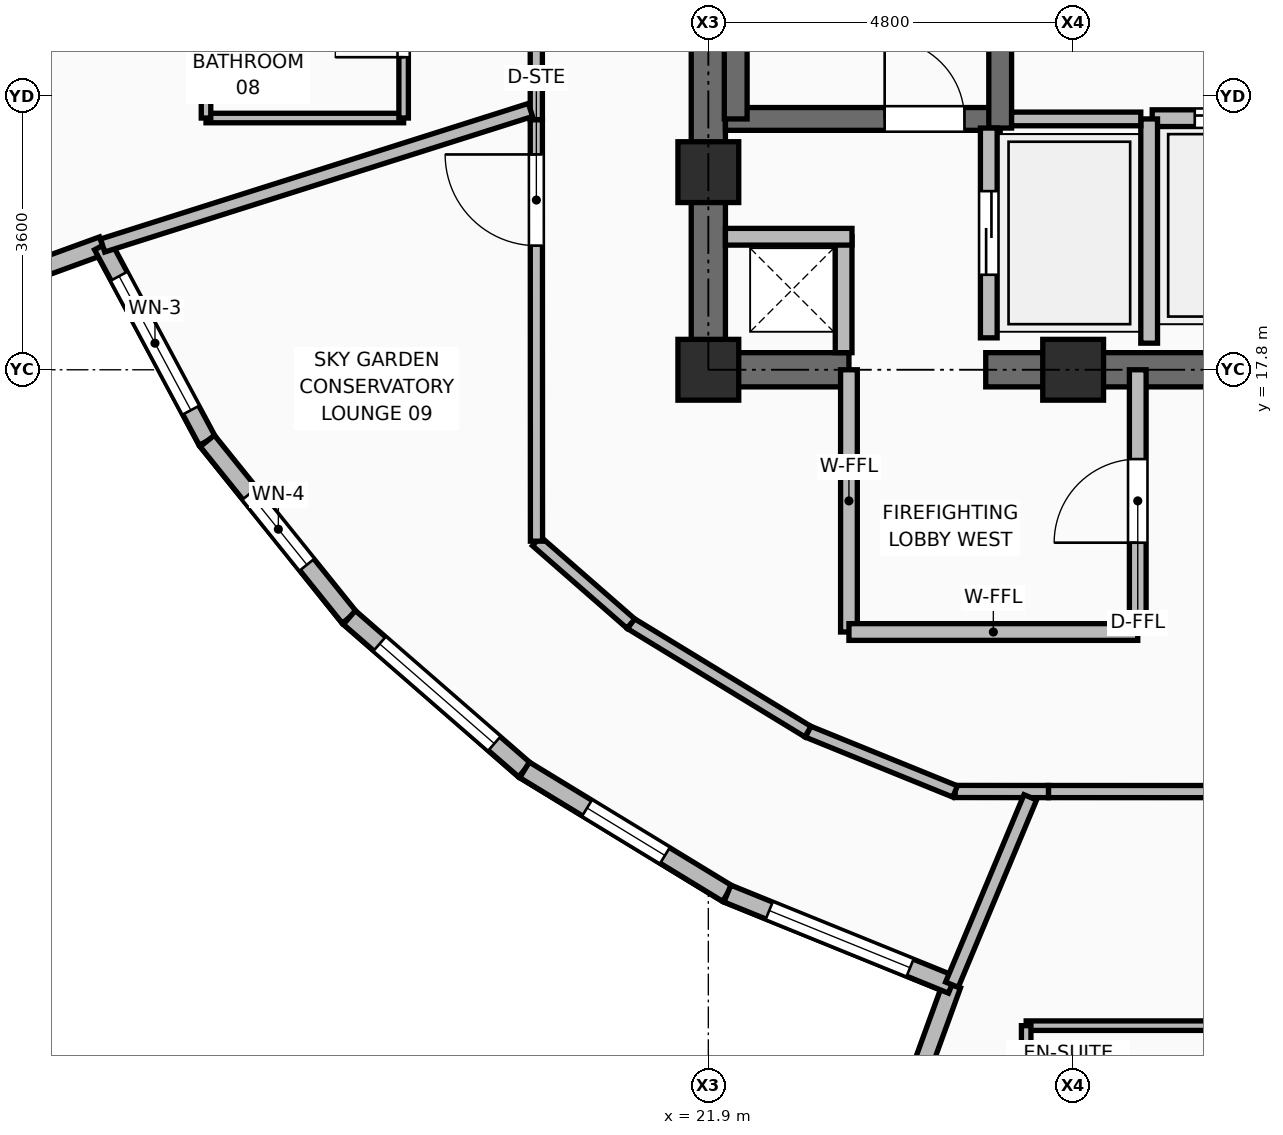
"""IFC4 building model, lengths in metres.
Left out: names, types, materials, properties, quantities, classifications, styles, units other than length and angle.
Written with IfcOpenShell. Run it as: python <this file> out.ifc"""

import sys

from ifc_helpers import new_model, si_unit, direction, frame, frame_2d, origin, origin_2d, place, context, subcontext, project, spatial, rectangle, extrude, element, fill, save


model = new_model("IFC4")
c1 = context("Model", 3, precision=1e-05, world=origin(), true_north=direction((0.0, 1.0)))
c2 = subcontext(c1, "Body", "Model", "MODEL_VIEW")
j1 = project(units=[si_unit("LENGTHUNIT", "METRE"), si_unit("PLANEANGLEUNIT", "RADIAN")], contexts=[c1])
p1 = place(None, origin())
s1 = spatial("IfcSite", under=j1, at=p1, CompositionType="ELEMENT")
p2 = place(p1, origin())
s2 = spatial("IfcBuilding", under=s1, at=p2, CompositionType="ELEMENT")
p3 = place(p2, frame((0.0, 0.0, 216.15)))
s3 = spatial("IfcBuildingStorey", under=s2, at=p3, CompositionType="ELEMENT", Elevation=216.15)
for number, where, z_axis, x_axis in (
    (1, (21.9, 17.8, 0.0), (0.0, 0.0, 1.0), (1.0, 0.0, 0.0)),
    (2, (26.7, 17.8, 0.0), (0.0, 0.0, 1.0), (1.0, 0.0, 0.0)),
    (3, (21.9, 20.4, 0.0), (0.0, 0.0, 1.0), (1.0, 0.0, 0.0)),
):
    element("IfcColumn", number, at=place(p3, frame(where, z_axis=z_axis, x_axis=x_axis)), inside=s3, PredefinedType="COLUMN", context=c2, shape_type="SweptSolid", body=[
        extrude(rectangle(XDim=0.8, YDim=0.8, at=origin_2d()), origin(), (0.0, 0.0, 1.0), 3.75),
    ])
for number, where, z_axis, x_axis in (
    (4, (10.36, 18.135, 0.0), (0.0, 0.0, 1.0), (0.94, 0.342, 0.0)),
    (5, (25.105, 9.71, 0.0), (0.0, 0.0, 1.0), (-0.342, -0.94, 0.0)),
):
    element("IfcWall", number, at=place(p3, frame(where, z_axis=z_axis, x_axis=x_axis)), inside=s3, PredefinedType="SOLIDWALL", context=c2, shape_type="SweptSolid", body=[
        extrude(rectangle(XDim=3.8, YDim=0.24, at=frame_2d((1.9, 0.0))), origin(), (0.0, 0.0, 1.0), 3.57),
    ])
p4 = place(p3, frame((13.931, 19.435, 0.0), z_axis=(0.0, 0.0, 1.0), x_axis=(0.472181923686, -0.88150112362, 0.0)))
e6 = element("IfcWall", 6, at=p4, inside=s3, PredefinedType="SOLIDWALL", context=c2, shape_type="SweptSolid", body=[
    extrude(rectangle(XDim=2.917, YDim=0.24, at=frame_2d((1.458, 0.0))), origin(), (0.0, 0.0, 1.0), 3.57),
])
p5 = place(p4, frame((0.458, 0.0, 0.85)))
e7 = element("IfcOpeningElement", 7, at=p5, cuts=e6, PredefinedType="OPENING", context=c2, shape_type="SweptSolid", body=[
    extrude(rectangle(XDim=2.0, YDim=2.4, at=frame_2d((1.0, 1.2))), frame((0.0, 0.13, 0.0), z_axis=(0.0, -1.0, 0.0), x_axis=(1.0, 0.0, 0.0)), (0.0, 0.0, 1.0), 0.26),
])
p6 = place(p3, frame((15.308, 16.864, 0.0), z_axis=(0.0, 0.0, 1.0), x_axis=(0.626839705348, -0.779148242506, 0.0)))
e8 = element("IfcWall", 8, at=p6, inside=s3, PredefinedType="SOLIDWALL", context=c2, shape_type="SweptSolid", body=[
    extrude(rectangle(XDim=2.981, YDim=0.24, at=frame_2d((1.491, 0.0))), origin(), (0.0, 0.0, 1.0), 3.57),
])
p7 = place(p6, frame((0.891, 0.0, 0.85)))
e9 = element("IfcOpeningElement", 9, at=p7, cuts=e8, PredefinedType="OPENING", context=c2, shape_type="SweptSolid", body=[
    extrude(rectangle(XDim=1.2, YDim=1.8, at=frame_2d((0.6, 0.9))), frame((0.0, 0.13, 0.0), z_axis=(0.0, -1.0, 0.0), x_axis=(1.0, 0.0, 0.0)), (0.0, 0.0, 1.0), 0.26),
])
p8 = place(p3, frame((17.177, 14.541, 0.0), z_axis=(0.0, 0.0, 1.0), x_axis=(0.754469591688, -0.656335002281, 0.0)))
e10 = element("IfcWall", 10, at=p8, inside=s3, PredefinedType="SOLIDWALL", context=c2, shape_type="SweptSolid", body=[
    extrude(rectangle(XDim=3.055, YDim=0.24, at=frame_2d((1.527, 0.0))), origin(), (0.0, 0.0, 1.0), 3.57),
])
p9 = place(p8, frame((0.528, 0.0, 0.85)))
e11 = element("IfcOpeningElement", 11, at=p9, cuts=e10, PredefinedType="OPENING", context=c2, shape_type="SweptSolid", body=[
    extrude(rectangle(XDim=2.0, YDim=2.4, at=frame_2d((1.0, 1.2))), frame((0.0, 0.13, 0.0), z_axis=(0.0, -1.0, 0.0), x_axis=(1.0, 0.0, 0.0)), (0.0, 0.0, 1.0), 0.26),
])
p10 = place(p3, frame((19.482, 12.536, 0.0), z_axis=(0.0, 0.0, 1.0), x_axis=(0.853860524169, -0.520501878253, 0.0)))
e12 = element("IfcWall", 12, at=p10, inside=s3, PredefinedType="SOLIDWALL", context=c2, shape_type="SweptSolid", body=[
    extrude(rectangle(XDim=3.126, YDim=0.24, at=frame_2d((1.563, 0.0))), origin(), (0.0, 0.0, 1.0), 3.57),
])
p11 = place(p10, frame((0.963, 0.0, 0.85)))
e13 = element("IfcOpeningElement", 13, at=p11, cuts=e12, PredefinedType="OPENING", context=c2, shape_type="SweptSolid", body=[
    extrude(rectangle(XDim=1.2, YDim=1.8, at=frame_2d((0.6, 0.9))), frame((0.0, 0.13, 0.0), z_axis=(0.0, -1.0, 0.0), x_axis=(1.0, 0.0, 0.0)), (0.0, 0.0, 1.0), 0.26),
])
p12 = place(p3, frame((22.151, 10.909, 0.0), z_axis=(0.0, 0.0, 1.0), x_axis=(0.926590027223, -0.376073026752, 0.0)))
e14 = element("IfcWall", 14, at=p12, inside=s3, PredefinedType="SOLIDWALL", context=c2, shape_type="SweptSolid", body=[
    extrude(rectangle(XDim=3.188, YDim=0.24, at=frame_2d((1.594, 0.0))), origin(), (0.0, 0.0, 1.0), 3.57),
])
p13 = place(p12, frame((0.594, 0.0, 0.85)))
e15 = element("IfcOpeningElement", 15, at=p13, cuts=e14, PredefinedType="OPENING", context=c2, shape_type="SweptSolid", body=[
    extrude(rectangle(XDim=2.0, YDim=2.4, at=frame_2d((1.0, 1.2))), frame((0.0, 0.13, 0.0), z_axis=(0.0, -1.0, 0.0), x_axis=(1.0, 0.0, 0.0)), (0.0, 0.0, 1.0), 0.26),
])
p14 = place(p3, frame((21.675, 17.8, 0.0), z_axis=(0.0, 0.0, 1.0), x_axis=(1.0, 0.0, 0.0)))
e16 = element("IfcWall", 16, at=p14, inside=s3, PredefinedType="SHEAR", context=c2, shape_type="SweptSolid", body=[
    extrude(rectangle(XDim=2.075, YDim=0.45, at=frame_2d((1.038, 0.0))), origin(), (0.0, 0.0, 1.0), 3.57),
])
p15 = place(p3, frame((25.55, 17.8, 0.0), z_axis=(0.0, 0.0, 1.0), x_axis=(1.0, 0.0, 0.0)))
e17 = element("IfcWall", 17, at=p15, inside=s3, PredefinedType="SHEAR", context=c2, shape_type="SweptSolid", body=[
    extrude(rectangle(XDim=6.9, YDim=0.45, at=frame_2d((3.45, 0.0))), origin(), (0.0, 0.0, 1.0), 3.57),
])
p16 = place(p3, frame((21.9, 18.025, 0.0), z_axis=(0.0, 0.0, 1.0), x_axis=(0.0, 1.0, 0.0)))
e18 = element("IfcWall", 18, at=p16, inside=s3, PredefinedType="SHEAR", context=c2, shape_type="SweptSolid", body=[
    extrude(rectangle(XDim=14.2, YDim=0.45, at=frame_2d((7.1, 0.0))), origin(), (0.0, 0.0, 1.0), 3.57),
])
p17 = place(p3, frame((22.125, 21.1, 0.0), z_axis=(0.0, 0.0, 1.0), x_axis=(1.0, 0.0, 0.0)))
e19 = element("IfcWall", 19, at=p17, inside=s3, PredefinedType="SHEAR", context=c2, shape_type="SweptSolid", body=[
    extrude(rectangle(XDim=3.615, YDim=0.3, at=frame_2d((1.808, 0.0))), origin(), (0.0, 0.0, 1.0), 3.57),
])
p18 = place(p17, frame((2.095, 0.0, 0.0)))
e20 = element("IfcOpeningElement", 20, at=p18, cuts=e19, PredefinedType="OPENING", context=c2, shape_type="SweptSolid", body=[
    extrude(rectangle(XDim=1.05, YDim=2.1, at=frame_2d((0.525, 1.05))), frame((0.0, 0.16, 0.0), z_axis=(0.0, -1.0, 0.0), x_axis=(1.0, 0.0, 0.0)), (0.0, 0.0, 1.0), 0.32),
])
p19 = place(p3, frame((25.74, 20.98, 0.0), z_axis=(0.0, 0.0, 1.0), x_axis=(0.0, 1.0, 0.0)))
e21 = element("IfcWall", 21, at=p19, inside=s3, PredefinedType="SHEAR", context=c2, shape_type="SweptSolid", body=[
    extrude(rectangle(XDim=7.99, YDim=0.3, at=frame_2d((3.995, 0.0))), origin(), (0.0, 0.0, 1.0), 3.57),
])
p20 = place(p3, frame((22.26, 21.1, 0.0), z_axis=(0.0, 0.0, 1.0), x_axis=(0.0, 1.0, 0.0)))
e22 = element("IfcWall", 22, at=p20, inside=s3, PredefinedType="SHEAR", context=c2, shape_type="SweptSolid", body=[
    extrude(rectangle(XDim=7.75, YDim=0.3, at=frame_2d((3.875, 0.0))), origin(), (0.0, 0.0, 1.0), 3.57),
])
p21 = place(p3, frame((23.68, 18.025, 0.0), z_axis=(0.0, 0.0, 1.0), x_axis=(0.0, 1.0, 0.0)))
e23 = element("IfcWall", 23, at=p21, inside=s3, PredefinedType="PARTITIONING", context=c2, shape_type="SweptSolid", body=[
    extrude(rectangle(XDim=1.525, YDim=0.22, at=frame_2d((0.763, 0.0))), origin(), (0.0, 0.0, 1.0), 3.55),
])
p22 = place(p3, frame((22.125, 19.55, 0.0), z_axis=(0.0, 0.0, 1.0), x_axis=(1.0, 0.0, 0.0)))
e24 = element("IfcWall", 24, at=p22, inside=s3, PredefinedType="PARTITIONING", context=c2, shape_type="SweptSolid", body=[
    extrude(rectangle(XDim=1.665, YDim=0.22, at=frame_2d((0.833, 0.0))), origin(), (0.0, 0.0, 1.0), 2.595),
])
p23 = place(p3, frame((25.59, 18.22, 0.0), z_axis=(0.0, 0.0, 1.0), x_axis=(0.0, 1.0, 0.0)))
e25 = element("IfcWall", 25, at=p23, inside=s3, PredefinedType="PARTITIONING", context=c2, shape_type="SweptSolid", body=[
    extrude(rectangle(XDim=2.76, YDim=0.22, at=frame_2d((1.38, 0.0))), origin(), (0.0, 0.0, 1.0), 3.55),
])
p24 = place(p23, frame((0.83, 0.0, 0.0)))
e26 = element("IfcOpeningElement", 26, at=p24, cuts=e25, PredefinedType="OPENING", context=c2, shape_type="SweptSolid", body=[
    extrude(rectangle(XDim=1.1, YDim=2.2, at=frame_2d((0.55, 1.1))), frame((0.0, 0.12, 0.0), z_axis=(0.0, -1.0, 0.0), x_axis=(1.0, 0.0, 0.0)), (0.0, 0.0, 1.0), 0.24),
])
p25 = place(p3, frame((27.74, 21.11, 0.0), z_axis=(0.0, 0.0, 1.0), x_axis=(1.0, 0.0, 0.0)))
e27 = element("IfcWall", 27, at=p25, inside=s3, PredefinedType="PARTITIONING", context=c2, shape_type="SweptSolid", body=[
    extrude(rectangle(XDim=2.22, YDim=0.22, at=frame_2d((1.11, 0.0))), origin(), (0.0, 0.0, 1.0), 3.55),
])
p26 = place(p25, frame((0.56, 0.0, 0.0)))
e28 = element("IfcOpeningElement", 28, at=p26, cuts=e27, PredefinedType="OPENING", context=c2, shape_type="SweptSolid", body=[
    extrude(rectangle(XDim=1.1, YDim=2.2, at=frame_2d((0.55, 1.1))), frame((0.0, 0.12, 0.0), z_axis=(0.0, -1.0, 0.0), x_axis=(1.0, 0.0, 0.0)), (0.0, 0.0, 1.0), 0.24),
])
p27 = place(p3, frame((27.7, 18.15, 0.0), z_axis=(0.0, 0.0, 1.0), x_axis=(0.0, 1.0, 0.0)))
e29 = element("IfcWall", 29, at=p27, inside=s3, PredefinedType="PARTITIONING", context=c2, shape_type="SweptSolid", body=[
    extrude(rectangle(XDim=2.95, YDim=0.22, at=frame_2d((1.475, 0.0))), origin(), (0.0, 0.0, 1.0), 3.55),
])
p28 = place(p3, frame((25.89, 21.1, 0.0), z_axis=(0.0, 0.0, 1.0), x_axis=(1.0, 0.0, 0.0)))
e30 = element("IfcWall", 30, at=p28, inside=s3, PredefinedType="PARTITIONING", context=c2, shape_type="SweptSolid", body=[
    extrude(rectangle(XDim=1.7, YDim=0.18, at=frame_2d((0.85, 0.0))), origin(), (0.0, 0.0, 1.0), 3.55),
])
p29 = place(p3, frame((23.75, 14.35, 0.0), z_axis=(0.0, 0.0, 1.0), x_axis=(0.0, 1.0, 0.0)))
e31 = element("IfcWall", 31, at=p29, inside=s3, PredefinedType="PARTITIONING", context=c2, shape_type="SweptSolid", body=[
    extrude(rectangle(XDim=3.45, YDim=0.22, at=frame_2d((1.725, 0.0))), origin(), (0.0, 0.0, 1.0), 3.081),
])
p30 = place(p3, frame((23.75, 14.35, 0.0), z_axis=(0.0, 0.0, 1.0), x_axis=(1.0, 0.0, 0.0)))
e32 = element("IfcWall", 32, at=p30, inside=s3, PredefinedType="PARTITIONING", context=c2, shape_type="SweptSolid", body=[
    extrude(rectangle(XDim=3.8, YDim=0.22, at=frame_2d((1.9, 0.0))), origin(), (0.0, 0.0, 1.0), 3.55),
])
p31 = place(p3, frame((27.55, 14.35, 0.0), z_axis=(0.0, 0.0, 1.0), x_axis=(0.0, 1.0, 0.0)))
e33 = element("IfcWall", 33, at=p31, inside=s3, PredefinedType="PARTITIONING", context=c2, shape_type="SweptSolid", body=[
    extrude(rectangle(XDim=3.45, YDim=0.22, at=frame_2d((1.725, 0.0))), origin(), (0.0, 0.0, 1.0), 3.081),
])
p32 = place(p31, frame((1.175, 0.0, 0.0)))
e34 = element("IfcOpeningElement", 34, at=p32, cuts=e33, PredefinedType="OPENING", context=c2, shape_type="SweptSolid", body=[
    extrude(rectangle(XDim=1.1, YDim=2.1, at=frame_2d((0.55, 1.05))), frame((0.0, 0.12, 0.0), z_axis=(0.0, -1.0, 0.0), x_axis=(1.0, 0.0, 0.0)), (0.0, 0.0, 1.0), 0.24),
])
p33 = place(p3, frame((30.26, 12.25, 0.0), z_axis=(0.0, 0.0, 1.0), x_axis=(-0.999999968407, 0.000251366799, 0.0)))
e35 = element("IfcWall", 35, at=p33, inside=s3, PredefinedType="PARTITIONING", context=c2, shape_type="SweptSolid", body=[
    extrude(rectangle(XDim=3.885, YDim=0.16, at=frame_2d((1.942, 0.0))), origin(), (0.0, 0.0, 1.0), 3.55),
])
p34 = place(p33, frame((0.16, 0.0, 0.0)))
e36 = element("IfcOpeningElement", 36, at=p34, cuts=e35, PredefinedType="OPENING", context=c2, shape_type="SweptSolid", body=[
    extrude(rectangle(XDim=1.0, YDim=2.1, at=frame_2d((0.5, 1.05))), frame((0.0, 0.09, 0.0), z_axis=(0.0, -1.0, 0.0), x_axis=(1.0, 0.0, 0.0)), (0.0, 0.0, 1.0), 0.18),
])
p35 = place(p3, frame((26.375, 12.251, 0.0), z_axis=(0.0, 0.0, 1.0), x_axis=(-0.999999683806, 0.000795228377, 0.0)))
e37 = element("IfcWall", 37, at=p35, inside=s3, PredefinedType="PARTITIONING", context=c2, shape_type="SweptSolid", body=[
    extrude(rectangle(XDim=1.228, YDim=0.16, at=frame_2d((0.614, 0.0))), origin(), (0.0, 0.0, 1.0), 3.55),
])
p36 = place(p3, frame((25.147, 12.252, 0.0), z_axis=(0.0, 0.0, 1.0), x_axis=(-0.926367254425, 0.376621441143, 0.0)))
e38 = element("IfcWall", 38, at=p36, inside=s3, PredefinedType="PARTITIONING", context=c2, shape_type="SweptSolid", body=[
    extrude(rectangle(XDim=2.09, YDim=0.16, at=frame_2d((1.045, 0.0))), origin(), (0.0, 0.0, 1.0), 3.55),
])
p37 = place(p3, frame((23.211, 13.039, 0.0), z_axis=(0.0, 0.0, 1.0), x_axis=(-0.853752527211, 0.520679001191, 0.0)))
e39 = element("IfcWall", 39, at=p37, inside=s3, PredefinedType="PARTITIONING", context=c2, shape_type="SweptSolid", body=[
    extrude(rectangle(XDim=2.729, YDim=0.16, at=frame_2d((1.365, 0.0))), origin(), (0.0, 0.0, 1.0), 3.081),
])
p38 = place(p3, frame((20.881, 14.46, 0.0), z_axis=(0.0, 0.0, 1.0), x_axis=(-0.753163265412, 0.657833638265, 0.0)))
e40 = element("IfcWall", 40, at=p38, inside=s3, PredefinedType="PARTITIONING", context=c2, shape_type="SweptSolid", body=[
    extrude(rectangle(XDim=1.649, YDim=0.16, at=frame_2d((0.825, 0.0))), origin(), (0.0, 0.0, 1.0), 3.55),
])
p39 = place(p3, frame((19.639, 15.545, 0.0), z_axis=(0.0, 0.0, 1.0), x_axis=(-0.000352159154, 0.999999937992, 0.0)))
e41 = element("IfcWall", 41, at=p39, inside=s3, PredefinedType="PARTITIONING", context=c2, shape_type="SweptSolid", body=[
    extrude(rectangle(XDim=5.546, YDim=0.16, at=frame_2d((2.773, 0.0))), origin(), (0.0, 0.0, 1.0), 3.081),
])
p40 = place(p39, frame((3.888, 0.0, 0.0)))
e42 = element("IfcOpeningElement", 42, at=p40, cuts=e41, PredefinedType="OPENING", context=c2, shape_type="SweptSolid", body=[
    extrude(rectangle(XDim=1.2, YDim=2.1, at=frame_2d((0.6, 1.05))), frame((0.0, 0.09, 0.0), z_axis=(0.0, -1.0, 0.0), x_axis=(1.0, 0.0, 0.0)), (0.0, 0.0, 1.0), 0.18),
])
p41 = place(p3, frame((19.637, 21.091, 0.0), z_axis=(0.0, 0.0, 1.0), x_axis=(-0.000352951535, 0.999999937713, 0.0)))
e43 = element("IfcWall", 43, at=p41, inside=s3, PredefinedType="PARTITIONING", context=c2, shape_type="SweptSolid", body=[
    extrude(rectangle(XDim=2.767, YDim=0.16, at=frame_2d((1.383, 0.0))), origin(), (0.0, 0.0, 1.0), 3.081),
])
p42 = place(p3, frame((19.56, 21.218, 0.0), z_axis=(0.0, 0.0, 1.0), x_axis=(-0.953322985511, -0.301952455358, 0.0)))
e44 = element("IfcWall", 44, at=p42, inside=s3, PredefinedType="PARTITIONING", context=c2, shape_type="SweptSolid", body=[
    extrude(rectangle(XDim=5.905, YDim=0.18, at=frame_2d((2.952, 0.0))), origin(), (0.0, 0.0, 1.0), 3.081),
])
p43 = place(p3, frame((26.136, 12.175, 0.0), z_axis=(0.0, 0.0, 1.0), x_axis=(-0.385854205699, -0.922559771475, 0.0)))
e45 = element("IfcWall", 45, at=p43, inside=s3, PredefinedType="PARTITIONING", context=c2, shape_type="SweptSolid", body=[
    extrude(rectangle(XDim=2.672, YDim=0.18, at=frame_2d((1.336, 0.0))), origin(), (0.0, 0.0, 1.0), 3.55),
])
p44 = place(p3, frame((15.291, 21.112, 0.0), z_axis=(0.0, 0.0, 1.0), x_axis=(1.0, 0.0, 0.0)))
e46 = element("IfcWall", 46, at=p44, inside=s3, PredefinedType="PARTITIONING", context=c2, shape_type="SweptSolid", body=[
    extrude(rectangle(XDim=2.6, YDim=0.125, at=frame_2d((1.3, 0.0))), origin(), (0.0, 0.0, 1.0), 3.55),
])
p45 = place(p3, frame((15.291, 21.112, 0.0), z_axis=(0.0, 0.0, 1.0), x_axis=(0.0, 1.0, 0.0)))
e47 = element("IfcWall", 47, at=p45, inside=s3, PredefinedType="PARTITIONING", context=c2, shape_type="SweptSolid", body=[
    extrude(rectangle(XDim=2.5, YDim=0.125, at=frame_2d((1.25, 0.0))), origin(), (0.0, 0.0, 1.0), 3.081),
])
p46 = place(p3, frame((17.891, 21.112, 0.0), z_axis=(0.0, 0.0, 1.0), x_axis=(0.0, 1.0, 0.0)))
e48 = element("IfcWall", 48, at=p46, inside=s3, PredefinedType="PARTITIONING", context=c2, shape_type="SweptSolid", body=[
    extrude(rectangle(XDim=2.5, YDim=0.125, at=frame_2d((1.25, 0.0))), origin(), (0.0, 0.0, 1.0), 3.081),
])
p47 = place(p46, frame((0.8, 0.0, 0.0)))
e49 = element("IfcOpeningElement", 49, at=p47, cuts=e48, PredefinedType="OPENING", context=c2, shape_type="SweptSolid", body=[
    extrude(rectangle(XDim=0.9, YDim=2.1, at=frame_2d((0.45, 1.05))), frame((0.0, 0.073, 0.0), z_axis=(0.0, -1.0, 0.0), x_axis=(1.0, 0.0, 0.0)), (0.0, 0.0, 1.0), 0.145),
])
p48 = place(p3, frame((26.082, 9.171, 0.0), z_axis=(0.0, 0.0, 1.0), x_axis=(1.0, 0.0, 0.0)))
e50 = element("IfcWall", 50, at=p48, inside=s3, PredefinedType="PARTITIONING", context=c2, shape_type="SweptSolid", body=[
    extrude(rectangle(XDim=2.6, YDim=0.125, at=frame_2d((1.3, 0.0))), origin(), (0.0, 0.0, 1.0), 3.55),
])
p49 = place(p3, frame((26.082, 6.671, 0.0), z_axis=(0.0, 0.0, 1.0), x_axis=(0.0, 1.0, 0.0)))
e51 = element("IfcWall", 51, at=p49, inside=s3, PredefinedType="PARTITIONING", context=c2, shape_type="SweptSolid", body=[
    extrude(rectangle(XDim=2.5, YDim=0.125, at=frame_2d((1.25, 0.0))), origin(), (0.0, 0.0, 1.0), 2.925),
])
p50 = place(p5, origin())
e52 = element("IfcWindow", 52, at=p50, inside=s3, PartitioningType="SINGLE_PANEL", PredefinedType="WINDOW", context=c2, shape_type="SweptSolid", body=[
    extrude(rectangle(XDim=2.0, YDim=2.4, at=frame_2d((1.0, 1.2))), frame((0.0, 0.03, 0.0), z_axis=(0.0, -1.0, 0.0), x_axis=(1.0, 0.0, 0.0)), (0.0, 0.0, 1.0), 0.06),
])
fill(e7, e52)
p51 = place(p7, origin())
e53 = element("IfcWindow", 53, at=p51, inside=s3, PartitioningType="SINGLE_PANEL", PredefinedType="WINDOW", context=c2, shape_type="SweptSolid", body=[
    extrude(rectangle(XDim=1.2, YDim=1.8, at=frame_2d((0.6, 0.9))), frame((0.0, 0.03, 0.0), z_axis=(0.0, -1.0, 0.0), x_axis=(1.0, 0.0, 0.0)), (0.0, 0.0, 1.0), 0.06),
])
fill(e9, e53)
p52 = place(p9, origin())
e54 = element("IfcWindow", 54, at=p52, inside=s3, PartitioningType="SINGLE_PANEL", PredefinedType="WINDOW", context=c2, shape_type="SweptSolid", body=[
    extrude(rectangle(XDim=2.0, YDim=2.4, at=frame_2d((1.0, 1.2))), frame((0.0, 0.03, 0.0), z_axis=(0.0, -1.0, 0.0), x_axis=(1.0, 0.0, 0.0)), (0.0, 0.0, 1.0), 0.06),
])
fill(e11, e54)
p53 = place(p11, origin())
e55 = element("IfcWindow", 55, at=p53, inside=s3, PartitioningType="SINGLE_PANEL", PredefinedType="WINDOW", context=c2, shape_type="SweptSolid", body=[
    extrude(rectangle(XDim=1.2, YDim=1.8, at=frame_2d((0.6, 0.9))), frame((0.0, 0.03, 0.0), z_axis=(0.0, -1.0, 0.0), x_axis=(1.0, 0.0, 0.0)), (0.0, 0.0, 1.0), 0.06),
])
fill(e13, e55)
p54 = place(p13, origin())
e56 = element("IfcWindow", 56, at=p54, inside=s3, PartitioningType="SINGLE_PANEL", PredefinedType="WINDOW", context=c2, shape_type="SweptSolid", body=[
    extrude(rectangle(XDim=2.0, YDim=2.4, at=frame_2d((1.0, 1.2))), frame((0.0, 0.03, 0.0), z_axis=(0.0, -1.0, 0.0), x_axis=(1.0, 0.0, 0.0)), (0.0, 0.0, 1.0), 0.06),
])
fill(e15, e56)
p55 = place(p18, origin())
e57 = element("IfcDoor", 57, at=p55, inside=s3, OperationType="SINGLE_SWING_LEFT", PredefinedType="DOOR", context=c2, shape_type="SweptSolid", body=[
    extrude(rectangle(XDim=1.05, YDim=2.1, at=frame_2d((0.525, 1.05))), frame((0.0, 0.025, 0.0), z_axis=(0.0, -1.0, 0.0), x_axis=(1.0, 0.0, 0.0)), (0.0, 0.0, 1.0), 0.05),
])
fill(e20, e57)
p56 = place(p24, origin())
e58 = element("IfcDoor", 58, at=p56, inside=s3, OperationType="DOUBLE_DOOR_SLIDING", PredefinedType="DOOR", context=c2, shape_type="SweptSolid", body=[
    extrude(rectangle(XDim=1.1, YDim=2.2, at=frame_2d((0.55, 1.1))), frame((0.0, 0.025, 0.0), z_axis=(0.0, -1.0, 0.0), x_axis=(1.0, 0.0, 0.0)), (0.0, 0.0, 1.0), 0.05),
])
fill(e26, e58)
p57 = place(p26, origin())
e59 = element("IfcDoor", 59, at=p57, inside=s3, OperationType="DOUBLE_DOOR_SLIDING", PredefinedType="DOOR", context=c2, shape_type="SweptSolid", body=[
    extrude(rectangle(XDim=1.1, YDim=2.2, at=frame_2d((0.55, 1.1))), frame((0.0, 0.025, 0.0), z_axis=(0.0, -1.0, 0.0), x_axis=(1.0, 0.0, 0.0)), (0.0, 0.0, 1.0), 0.05),
])
fill(e28, e59)
p58 = place(p32, origin())
e60 = element("IfcDoor", 60, at=p58, inside=s3, OperationType="SINGLE_SWING_LEFT", PredefinedType="DOOR", context=c2, shape_type="SweptSolid", body=[
    extrude(rectangle(XDim=1.1, YDim=2.1, at=frame_2d((0.55, 1.05))), frame((0.0, 0.025, 0.0), z_axis=(0.0, -1.0, 0.0), x_axis=(1.0, 0.0, 0.0)), (0.0, 0.0, 1.0), 0.05),
])
fill(e34, e60)
p59 = place(p47, origin())
e61 = element("IfcDoor", 61, at=p59, inside=s3, OperationType="SINGLE_SWING_LEFT", PredefinedType="DOOR", context=c2, shape_type="SweptSolid", body=[
    extrude(rectangle(XDim=0.9, YDim=2.1, at=frame_2d((0.45, 1.05))), frame((0.0, 0.025, 0.0), z_axis=(0.0, -1.0, 0.0), x_axis=(1.0, 0.0, 0.0)), (0.0, 0.0, 1.0), 0.05),
])
fill(e49, e61)
p60 = place(p40, origin())
e62 = element("IfcDoor", 62, at=p60, inside=s3, OperationType="SINGLE_SWING_RIGHT", PredefinedType="DOOR", context=c2, shape_type="SweptSolid", body=[
    extrude(rectangle(XDim=1.2, YDim=2.1, at=frame_2d((0.6, 1.05))), frame((0.0, 0.025, 0.0), z_axis=(0.0, -1.0, 0.0), x_axis=(1.0, 0.0, 0.0)), (0.0, 0.0, 1.0), 0.05),
])
fill(e42, e62)
save(model, sys.argv[1])
